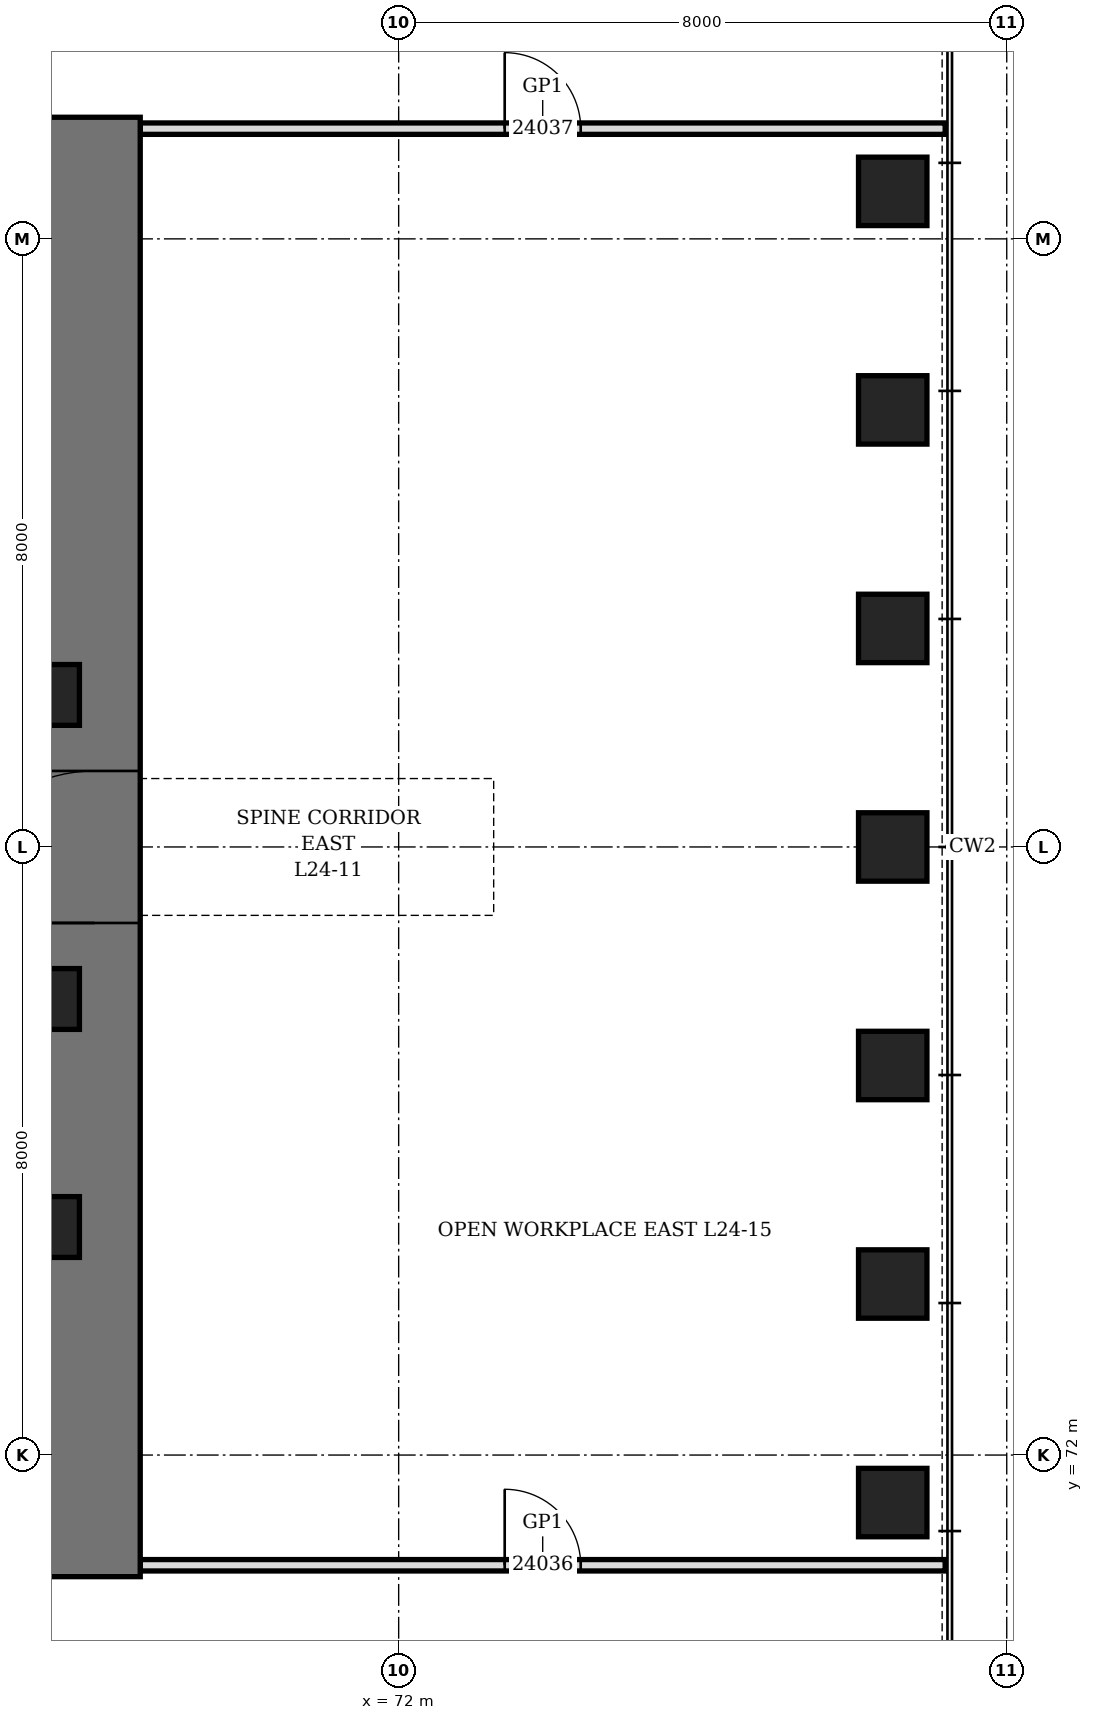
"""IFC4 building model, lengths in metres.
Left out: names, types, materials, properties, quantities, classifications, styles, units other than length and angle.
Written with IfcOpenShell. Run it as: python <this file> out.ifc"""

import sys

from ifc_helpers import new_model, si_unit, direction, frame, frame_2d, origin, origin_2d, place, context, subcontext, project, spatial, rectangle, hollow_rectangle, extrude, element, fill, save


model = new_model("IFC4")
c1 = context("Model", 3, precision=1e-05, world=origin(), true_north=direction((0.0, 1.0)))
c2 = subcontext(c1, "Body", "Model", "MODEL_VIEW")
j1 = project(units=[si_unit("LENGTHUNIT", "METRE"), si_unit("PLANEANGLEUNIT", "RADIAN")], contexts=[c1])
p1 = place(None, origin())
s1 = spatial("IfcSite", under=j1, at=p1, CompositionType="ELEMENT")
p2 = place(p1, origin())
s2 = spatial("IfcBuilding", under=s1, at=p2, CompositionType="ELEMENT")
p3 = place(p2, frame((0.0, 0.0, 112.3)))
s3 = spatial("IfcBuildingStorey", under=s2, at=p3, CompositionType="ELEMENT", Elevation=112.3)
for number, where, z_axis, x_axis in (
    (1, (78.5, 71.375, 0.0), (0.0, 0.0, 1.0), (0.0, 1.0, 0.0)),
    (2, (78.5, 74.25, 0.0), (0.0, 0.0, 1.0), (0.0, 1.0, 0.0)),
    (3, (78.5, 77.125, 0.0), (0.0, 0.0, 1.0), (0.0, 1.0, 0.0)),
    (4, (78.5, 80.0, 0.0), (0.0, 0.0, 1.0), (0.0, 1.0, 0.0)),
    (5, (78.5, 82.875, 0.0), (0.0, 0.0, 1.0), (0.0, 1.0, 0.0)),
    (6, (78.5, 85.75, 0.0), (0.0, 0.0, 1.0), (0.0, 1.0, 0.0)),
    (7, (78.5, 88.625, 0.0), (0.0, 0.0, 1.0), (0.0, 1.0, 0.0)),
):
    element("IfcColumn", number, at=place(p3, frame(where, z_axis=z_axis, x_axis=x_axis)), inside=s3, PredefinedType="COLUMN", context=c2, shape_type="SweptSolid", body=[
        extrude(hollow_rectangle(XDim=0.9, YDim=0.9, WallThickness=0.15, at=origin_2d()), origin(), (0.0, 0.0, 1.0), 4.2),
    ])
p4 = place(p3, frame((68.0, 70.4, 0.0), z_axis=(0.0, 0.0, 1.0), x_axis=(0.0, 1.0, 0.0)))
e8 = element("IfcWall", 8, at=p4, inside=s3, PredefinedType="SHEAR", context=c2, shape_type="SweptSolid", body=[
    extrude(rectangle(XDim=19.2, YDim=1.2, at=frame_2d((9.6, 0.0))), origin(), (0.0, 0.0, 1.0), 4.2),
])
p5 = place(p4, frame((8.6, 0.0, 0.0)))
e9 = element("IfcOpeningElement", 9, at=p5, cuts=e8, PredefinedType="OPENING", context=c2, shape_type="SweptSolid", body=[
    extrude(rectangle(XDim=2.0, YDim=2.4, at=frame_2d((1.0, 1.2))), frame((0.0, 0.61, 0.0), z_axis=(0.0, -1.0, 0.0), x_axis=(1.0, 0.0, 0.0)), (0.0, 0.0, 1.0), 1.22),
])
for number, where, z_axis, x_axis in (
    (10, (67.4, 75.0, 0.0), (0.0, 0.0, 1.0), (1.0, 0.0, 0.0)),
    (11, (67.4, 78.0, 0.0), (0.0, 0.0, 1.0), (1.0, 0.0, 0.0)),
    (12, (67.4, 82.0, 0.0), (0.0, 0.0, 1.0), (1.0, 0.0, 0.0)),
):
    element("IfcColumn", number, at=place(p3, frame(where, z_axis=z_axis, x_axis=x_axis)), inside=s3, PredefinedType="COLUMN", context=c2, shape_type="SweptSolid", body=[
        extrude(hollow_rectangle(XDim=0.8, YDim=0.8, WallThickness=0.1, at=origin_2d()), origin(), (0.0, 0.0, 1.0), 4.2),
    ])
p6 = place(p3, frame((68.6, 70.55, 0.0), z_axis=(0.0, 0.0, 1.0), x_axis=(1.0, 0.0, 0.0)))
e13 = element("IfcWall", 13, at=p6, inside=s3, PredefinedType="PARTITIONING", context=c2, shape_type="SweptSolid", body=[
    extrude(rectangle(XDim=10.59, YDim=0.15, at=frame_2d((5.295, 0.0))), origin(), (0.0, 0.0, 1.0), 4.04),
])
p7 = place(p6, frame((4.795, 0.0, 0.0)))
e14 = element("IfcOpeningElement", 14, at=p7, cuts=e13, PredefinedType="OPENING", context=c2, shape_type="SweptSolid", body=[
    extrude(rectangle(XDim=1.0, YDim=2.4, at=frame_2d((0.5, 1.2))), frame((0.0, 0.085, 0.0), z_axis=(0.0, -1.0, 0.0), x_axis=(1.0, 0.0, 0.0)), (0.0, 0.0, 1.0), 0.17),
])
p8 = place(p3, frame((68.6, 89.45, 0.0), z_axis=(0.0, 0.0, 1.0), x_axis=(1.0, 0.0, 0.0)))
e15 = element("IfcWall", 15, at=p8, inside=s3, PredefinedType="PARTITIONING", context=c2, shape_type="SweptSolid", body=[
    extrude(rectangle(XDim=10.59, YDim=0.15, at=frame_2d((5.295, 0.0))), origin(), (0.0, 0.0, 1.0), 4.04),
])
p9 = place(p8, frame((4.795, 0.0, 0.0)))
e16 = element("IfcOpeningElement", 16, at=p9, cuts=e15, PredefinedType="OPENING", context=c2, shape_type="SweptSolid", body=[
    extrude(rectangle(XDim=1.0, YDim=2.4, at=frame_2d((0.5, 1.2))), frame((0.0, 0.085, 0.0), z_axis=(0.0, -1.0, 0.0), x_axis=(1.0, 0.0, 0.0)), (0.0, 0.0, 1.0), 0.17),
])
p10 = place(p5, origin())
e17 = element("IfcDoor", 17, at=p10, inside=s3, OperationType="DOUBLE_DOOR_SINGLE_SWING", PredefinedType="DOOR", context=c2, shape_type="SweptSolid", body=[
    extrude(rectangle(XDim=2.0, YDim=2.4, at=frame_2d((1.0, 1.2))), frame((0.0, 0.35, 0.0), z_axis=(0.0, -1.0, 0.0), x_axis=(1.0, 0.0, 0.0)), (0.0, 0.0, 1.0), 0.7),
])
fill(e9, e17)
p11 = place(p7, origin())
e18 = element("IfcDoor", 18, at=p11, inside=s3, OperationType="SINGLE_SWING_RIGHT", PredefinedType="DOOR", context=c2, shape_type="SweptSolid", body=[
    extrude(rectangle(XDim=1.0, YDim=2.4, at=frame_2d((0.5, 1.2))), frame((0.0, 0.075, 0.0), z_axis=(0.0, -1.0, 0.0), x_axis=(1.0, 0.0, 0.0)), (0.0, 0.0, 1.0), 0.149),
])
fill(e14, e18)
p12 = place(p9, origin())
e19 = element("IfcDoor", 19, at=p12, inside=s3, OperationType="SINGLE_SWING_RIGHT", PredefinedType="DOOR", context=c2, shape_type="SweptSolid", body=[
    extrude(rectangle(XDim=1.0, YDim=2.4, at=frame_2d((0.5, 1.2))), frame((0.0, 0.075, 0.0), z_axis=(0.0, -1.0, 0.0), x_axis=(1.0, 0.0, 0.0)), (0.0, 0.0, 1.0), 0.149),
])
fill(e16, e19)
save(model, sys.argv[1])
